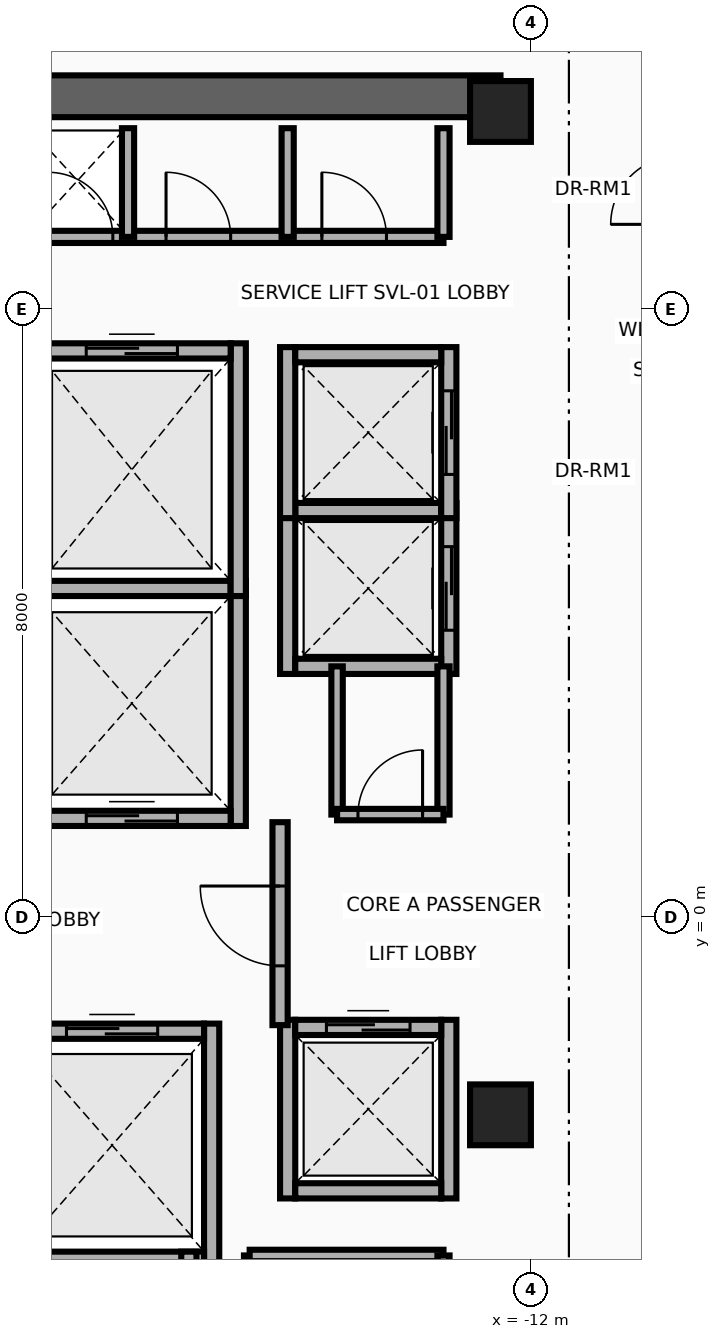
"""IFC4 building model, lengths in metres.
Left out: names, types, materials, properties, quantities, classifications, styles, units other than length and angle.
Written with IfcOpenShell. Run it as: python <this file> out.ifc"""

import sys

from ifc_helpers import new_model, si_unit, direction, frame, frame_2d, origin, origin_2d, place, context, subcontext, project, spatial, rectangle, extrude, source, transform, mapped, element, fill, save


model = new_model("IFC4")
c1 = context("Model", 3, precision=1e-05, world=origin(), true_north=direction((0.0, 1.0)))
c2 = subcontext(c1, "Body", "Model", "MODEL_VIEW")
j1 = project(units=[si_unit("LENGTHUNIT", "METRE"), si_unit("PLANEANGLEUNIT", "RADIAN")], contexts=[c1])
p1 = place(None, origin())
s1 = spatial("IfcSite", under=j1, at=p1, CompositionType="ELEMENT")
p2 = place(p1, origin())
s2 = spatial("IfcBuilding", under=s1, at=p2, CompositionType="ELEMENT")
p3 = place(p2, frame((0.0, 0.0, 251.0)))
s3 = spatial("IfcBuildingStorey", under=s2, at=p3, CompositionType="ELEMENT", Elevation=251.0)
p4 = place(p3, frame((-22.65, 10.8, 0.0), z_axis=(0.0, 0.0, 1.0), x_axis=(1.0, 0.0, 0.0)))
e1 = element("IfcWall", 1, at=p4, inside=s3, PredefinedType="SHEAR", context=c2, shape_type="SweptSolid", body=[
    extrude(rectangle(XDim=10.25, YDim=0.55, at=frame_2d((5.125, 0.0))), origin(), (0.0, 0.0, 1.0), 3.26),
])
m1 = source(origin(), c2, "Body", "SweptSolid", [
    extrude(rectangle(XDim=0.8, YDim=0.8, at=origin_2d()), origin(), (0.0, 0.0, 1.0), 3.5),
])
for number, where, z_axis, x_axis in (
    (2, (-12.4, -2.6, 0.0), (0.0, 0.0, 1.0), (1.0, 0.0, 0.0)),
    (3, (-12.4, 10.6, 0.0), (0.0, 0.0, 1.0), (1.0, 0.0, 0.0)),
):
    element("IfcColumn", number, at=place(p3, frame(where, z_axis=z_axis, x_axis=x_axis)), inside=s3, PredefinedType="COLUMN", context=c2, shape_type="MappedRepresentation", body=[
        mapped(m1, transform((0.0, 0.0, 0.0), x_axis=(1.0, 0.0, 0.0), y_axis=(0.0, 1.0, 0.0), z_axis=(0.0, 0.0, 1.0), scale=1.0)),
    ])
p5 = place(p3, frame((-15.85, 1.2, 0.0), z_axis=(0.0, 0.0, 1.0), x_axis=(0.0, 1.0, 0.0)))
e4 = element("IfcWall", 4, at=p5, inside=s3, PredefinedType="MOVABLE", context=c2, shape_type="SweptSolid", body=[
    extrude(rectangle(XDim=3.225, YDim=0.2, at=frame_2d((1.613, 0.0))), origin(), (0.0, 0.0, 1.0), 3.26),
])
p6 = place(p3, frame((-18.55, 1.3, 0.0), z_axis=(0.0, 0.0, 1.0), x_axis=(1.0, 0.0, 0.0)))
e5 = element("IfcWall", 5, at=p6, inside=s3, PredefinedType="MOVABLE", context=c2, shape_type="SweptSolid", body=[
    extrude(rectangle(XDim=2.6, YDim=0.2, at=frame_2d((1.3, 0.0))), origin(), (0.0, 0.0, 1.0), 3.26),
])
p7 = place(p6, frame((0.7, 0.0, 0.0)))
e6 = element("IfcOpeningElement", 6, at=p7, cuts=e5, PredefinedType="OPENING", context=c2, shape_type="SweptSolid", body=[
    extrude(rectangle(XDim=1.2, YDim=2.1, at=frame_2d((0.6, 1.05))), frame((0.0, 0.115, 0.0), z_axis=(0.0, -1.0, 0.0), x_axis=(1.0, 0.0, 0.0)), (0.0, 0.0, 1.0), 0.23),
])
p8 = place(p3, frame((-18.55, 4.325, 0.0), z_axis=(0.0, 0.0, 1.0), x_axis=(1.0, 0.0, 0.0)))
e7 = element("IfcWall", 7, at=p8, inside=s3, PredefinedType="MOVABLE", context=c2, shape_type="SweptSolid", body=[
    extrude(rectangle(XDim=2.6, YDim=0.2, at=frame_2d((1.3, 0.0))), origin(), (0.0, 0.0, 1.0), 3.26),
])
p9 = place(p3, frame((-16.2, -4.6, 0.0), z_axis=(0.0, 0.0, 1.0), x_axis=(0.0, 1.0, 0.0)))
e8 = element("IfcWall", 8, at=p9, inside=s3, PredefinedType="MOVABLE", context=c2, shape_type="SweptSolid", body=[
    extrude(rectangle(XDim=3.2, YDim=0.2, at=frame_2d((1.6, 0.0))), origin(), (0.0, 0.0, 1.0), 3.26),
])
p10 = place(p3, frame((-18.72, -4.5, 0.0), z_axis=(0.0, 0.0, 1.0), x_axis=(1.0, 0.0, 0.0)))
e9 = element("IfcWall", 9, at=p10, inside=s3, PredefinedType="MOVABLE", context=c2, shape_type="SweptSolid", body=[
    extrude(rectangle(XDim=2.42, YDim=0.2, at=frame_2d((1.21, 0.0))), origin(), (0.0, 0.0, 1.0), 3.26),
])
p11 = place(p3, frame((-18.72, -1.5, 0.0), z_axis=(0.0, 0.0, 1.0), x_axis=(1.0, 0.0, 0.0)))
e10 = element("IfcWall", 10, at=p11, inside=s3, PredefinedType="MOVABLE", context=c2, shape_type="SweptSolid", body=[
    extrude(rectangle(XDim=2.42, YDim=0.2, at=frame_2d((1.21, 0.0))), origin(), (0.0, 0.0, 1.0), 3.26),
])
p12 = place(p11, frame((0.61, 0.0, 0.0)))
e11 = element("IfcOpeningElement", 11, at=p12, cuts=e10, PredefinedType="OPENING", context=c2, shape_type="SweptSolid", body=[
    extrude(rectangle(XDim=1.2, YDim=2.1, at=frame_2d((0.6, 1.05))), frame((0.0, 0.115, 0.0), z_axis=(0.0, -1.0, 0.0), x_axis=(1.0, 0.0, 0.0)), (0.0, 0.0, 1.0), 0.23),
])
p13 = place(p3, frame((-15.85, 4.225, 0.0), z_axis=(0.0, 0.0, 1.0), x_axis=(0.0, 1.0, 0.0)))
e12 = element("IfcWall", 12, at=p13, inside=s3, PredefinedType="MOVABLE", context=c2, shape_type="SweptSolid", body=[
    extrude(rectangle(XDim=3.325, YDim=0.2, at=frame_2d((1.663, 0.0))), origin(), (0.0, 0.0, 1.0), 3.26),
])
p14 = place(p3, frame((-18.55, 7.45, 0.0), z_axis=(0.0, 0.0, 1.0), x_axis=(1.0, 0.0, 0.0)))
e13 = element("IfcWall", 13, at=p14, inside=s3, PredefinedType="MOVABLE", context=c2, shape_type="SweptSolid", body=[
    extrude(rectangle(XDim=2.6, YDim=0.2, at=frame_2d((1.3, 0.0))), origin(), (0.0, 0.0, 1.0), 3.26),
])
p15 = place(p14, frame((0.7, 0.0, 0.0)))
e14 = element("IfcOpeningElement", 14, at=p15, cuts=e13, PredefinedType="OPENING", context=c2, shape_type="SweptSolid", body=[
    extrude(rectangle(XDim=1.2, YDim=2.1, at=frame_2d((0.6, 1.05))), frame((0.0, 0.115, 0.0), z_axis=(0.0, -1.0, 0.0), x_axis=(1.0, 0.0, 0.0)), (0.0, 0.0, 1.0), 0.23),
])
p16 = place(p3, frame((-15.2, 3.2, 0.0), z_axis=(0.0, 0.0, 1.0), x_axis=(0.0, 1.0, 0.0)))
e15 = element("IfcWall", 15, at=p16, inside=s3, PredefinedType="MOVABLE", context=c2, shape_type="SweptSolid", body=[
    extrude(rectangle(XDim=2.25, YDim=0.2, at=frame_2d((1.125, 0.0))), origin(), (0.0, 0.0, 1.0), 3.26),
])
p17 = place(p3, frame((-13.08, 3.2, 0.0), z_axis=(0.0, 0.0, 1.0), x_axis=(0.0, 1.0, 0.0)))
e16 = element("IfcWall", 16, at=p17, inside=s3, PredefinedType="MOVABLE", context=c2, shape_type="SweptSolid", body=[
    extrude(rectangle(XDim=2.25, YDim=0.2, at=frame_2d((1.125, 0.0))), origin(), (0.0, 0.0, 1.0), 3.26),
])
p18 = place(p17, frame((0.575, 0.0, 0.0)))
e17 = element("IfcOpeningElement", 17, at=p18, cuts=e16, PredefinedType="OPENING", context=c2, shape_type="SweptSolid", body=[
    extrude(rectangle(XDim=1.1, YDim=2.1, at=frame_2d((0.55, 1.05))), frame((0.0, 0.115, 0.0), z_axis=(0.0, -1.0, 0.0), x_axis=(1.0, 0.0, 0.0)), (0.0, 0.0, 1.0), 0.23),
])
for number, where, z_axis, x_axis in (
    (18, (-15.1, 3.3, 0.0), (0.0, 0.0, 1.0), (1.0, 0.0, 0.0)),
    (19, (-15.1, 5.35, 0.0), (0.0, 0.0, 1.0), (1.0, 0.0, 0.0)),
):
    element("IfcWall", number, at=place(p3, frame(where, z_axis=z_axis, x_axis=x_axis)), inside=s3, PredefinedType="MOVABLE", context=c2, shape_type="SweptSolid", body=[
        extrude(rectangle(XDim=1.92, YDim=0.2, at=frame_2d((0.96, 0.0))), origin(), (0.0, 0.0, 1.0), 3.26),
    ])
p19 = place(p3, frame((-15.2, 5.25, 0.0), z_axis=(0.0, 0.0, 1.0), x_axis=(0.0, 1.0, 0.0)))
e20 = element("IfcWall", 20, at=p19, inside=s3, PredefinedType="MOVABLE", context=c2, shape_type="SweptSolid", body=[
    extrude(rectangle(XDim=2.25, YDim=0.2, at=frame_2d((1.125, 0.0))), origin(), (0.0, 0.0, 1.0), 3.26),
])
p20 = place(p3, frame((-13.08, 5.25, 0.0), z_axis=(0.0, 0.0, 1.0), x_axis=(0.0, 1.0, 0.0)))
e21 = element("IfcWall", 21, at=p20, inside=s3, PredefinedType="MOVABLE", context=c2, shape_type="SweptSolid", body=[
    extrude(rectangle(XDim=2.25, YDim=0.2, at=frame_2d((1.125, 0.0))), origin(), (0.0, 0.0, 1.0), 3.26),
])
p21 = place(p20, frame((0.575, 0.0, 0.0)))
e22 = element("IfcOpeningElement", 22, at=p21, cuts=e21, PredefinedType="OPENING", context=c2, shape_type="SweptSolid", body=[
    extrude(rectangle(XDim=1.1, YDim=2.1, at=frame_2d((0.55, 1.05))), frame((0.0, 0.115, 0.0), z_axis=(0.0, -1.0, 0.0), x_axis=(1.0, 0.0, 0.0)), (0.0, 0.0, 1.0), 0.23),
])
p22 = place(p3, frame((-15.1, 7.4, 0.0), z_axis=(0.0, 0.0, 1.0), x_axis=(1.0, 0.0, 0.0)))
e23 = element("IfcWall", 23, at=p22, inside=s3, PredefinedType="MOVABLE", context=c2, shape_type="SweptSolid", body=[
    extrude(rectangle(XDim=1.92, YDim=0.2, at=frame_2d((0.96, 0.0))), origin(), (0.0, 0.0, 1.0), 3.26),
])
p23 = place(p3, frame((-16.5, -6.7, 0.0), z_axis=(0.0, 0.0, 1.0), x_axis=(0.0, 1.0, 0.0)))
e24 = element("IfcWall", 24, at=p23, inside=s3, PredefinedType="MOVABLE", context=c2, shape_type="SweptSolid", body=[
    extrude(rectangle(XDim=2.3, YDim=0.2, at=frame_2d((1.15, 0.0))), origin(), (0.0, 0.0, 1.0), 3.26),
])
for number, where, z_axis, x_axis in (
    (25, (-15.2, -3.7, 0.0), (0.0, 0.0, 1.0), (0.0, 1.0, 0.0)),
    (26, (-13.08, -3.7, 0.0), (0.0, 0.0, 1.0), (0.0, 1.0, 0.0)),
):
    element("IfcWall", number, at=place(p3, frame(where, z_axis=z_axis, x_axis=x_axis)), inside=s3, PredefinedType="MOVABLE", context=c2, shape_type="SweptSolid", body=[
        extrude(rectangle(XDim=2.35, YDim=0.2, at=frame_2d((1.175, 0.0))), origin(), (0.0, 0.0, 1.0), 3.26),
    ])
p24 = place(p3, frame((-15.1, -3.6, 0.0), z_axis=(0.0, 0.0, 1.0), x_axis=(1.0, 0.0, 0.0)))
e27 = element("IfcWall", 27, at=p24, inside=s3, PredefinedType="MOVABLE", context=c2, shape_type="SweptSolid", body=[
    extrude(rectangle(XDim=1.92, YDim=0.2, at=frame_2d((0.96, 0.0))), origin(), (0.0, 0.0, 1.0), 3.26),
])
p25 = place(p3, frame((-15.1, -1.45, 0.0), z_axis=(0.0, 0.0, 1.0), x_axis=(1.0, 0.0, 0.0)))
e28 = element("IfcWall", 28, at=p25, inside=s3, PredefinedType="MOVABLE", context=c2, shape_type="SweptSolid", body=[
    extrude(rectangle(XDim=1.92, YDim=0.2, at=frame_2d((0.96, 0.0))), origin(), (0.0, 0.0, 1.0), 3.26),
])
p26 = place(p25, frame((0.41, 0.0, 0.0)))
e29 = element("IfcOpeningElement", 29, at=p26, cuts=e28, PredefinedType="OPENING", context=c2, shape_type="SweptSolid", body=[
    extrude(rectangle(XDim=1.1, YDim=2.1, at=frame_2d((0.55, 1.05))), frame((0.0, 0.115, 0.0), z_axis=(0.0, -1.0, 0.0), x_axis=(1.0, 0.0, 0.0)), (0.0, 0.0, 1.0), 0.23),
])
p27 = place(p3, frame((-15.3, -1.42, 0.0), z_axis=(0.0, 0.0, 1.0), x_axis=(0.0, 1.0, 0.0)))
e30 = element("IfcWall", 30, at=p27, inside=s3, PredefinedType="PARTITIONING", context=c2, shape_type="SweptSolid", body=[
    extrude(rectangle(XDim=2.67, YDim=0.2, at=frame_2d((1.335, 0.0))), origin(), (0.0, 0.0, 1.0), 3.26),
])
p28 = place(p27, frame((0.78, 0.0, 0.0)))
e31 = element("IfcOpeningElement", 31, at=p28, cuts=e30, PredefinedType="OPENING", context=c2, shape_type="SweptSolid", body=[
    extrude(rectangle(XDim=1.05, YDim=2.15, at=frame_2d((0.525, 1.075))), frame((0.0, 0.115, 0.0), z_axis=(0.0, -1.0, 0.0), x_axis=(1.0, 0.0, 0.0)), (0.0, 0.0, 1.0), 0.23),
])
p29 = place(p3, frame((-18.65, 8.95, 0.0), z_axis=(0.0, 0.0, 1.0), x_axis=(1.0, 0.0, 0.0)))
e32 = element("IfcWall", 32, at=p29, inside=s3, PredefinedType="PARTITIONING", context=c2, shape_type="SweptSolid", body=[
    extrude(rectangle(XDim=5.5, YDim=0.16, at=frame_2d((2.75, 0.0))), origin(), (0.0, 0.0, 1.0), 3.26),
])
p30 = place(p29, frame((0.3, 0.0, 0.0)))
e33 = element("IfcOpeningElement", 33, at=p30, cuts=e32, PredefinedType="OPENING", context=c2, shape_type="SweptSolid", body=[
    extrude(rectangle(XDim=0.85, YDim=2.05, at=frame_2d((0.425, 1.025))), frame((0.0, 0.095, 0.0), z_axis=(0.0, -1.0, 0.0), x_axis=(1.0, 0.0, 0.0)), (0.0, 0.0, 1.0), 0.19),
])
p31 = place(p29, frame((1.85, 0.0, 0.0)))
e34 = element("IfcOpeningElement", 34, at=p31, cuts=e32, PredefinedType="OPENING", context=c2, shape_type="SweptSolid", body=[
    extrude(rectangle(XDim=0.85, YDim=2.05, at=frame_2d((0.425, 1.025))), frame((0.0, 0.095, 0.0), z_axis=(0.0, -1.0, 0.0), x_axis=(1.0, 0.0, 0.0)), (0.0, 0.0, 1.0), 0.19),
])
p32 = place(p29, frame((3.9, 0.0, 0.0)))
e35 = element("IfcOpeningElement", 35, at=p32, cuts=e32, PredefinedType="OPENING", context=c2, shape_type="SweptSolid", body=[
    extrude(rectangle(XDim=0.85, YDim=2.05, at=frame_2d((0.425, 1.025))), frame((0.0, 0.095, 0.0), z_axis=(0.0, -1.0, 0.0), x_axis=(1.0, 0.0, 0.0)), (0.0, 0.0, 1.0), 0.19),
])
for number, where, z_axis, x_axis in (
    (36, (-13.15, 8.95, 0.0), (0.0, 0.0, 1.0), (0.0, 1.0, 0.0)),
    (37, (-17.3, 8.95, 0.0), (0.0, 0.0, 1.0), (0.0, 1.0, 0.0)),
    (38, (-15.2, 8.95, 0.0), (0.0, 0.0, 1.0), (0.0, 1.0, 0.0)),
):
    element("IfcWall", number, at=place(p3, frame(where, z_axis=z_axis, x_axis=x_axis)), inside=s3, PredefinedType="PARTITIONING", context=c2, shape_type="SweptSolid", body=[
        extrude(rectangle(XDim=1.43, YDim=0.16, at=frame_2d((0.715, 0.0))), origin(), (0.0, 0.0, 1.0), 3.26),
    ])
p33 = place(p3, frame((-15.7, -6.58, 0.0), z_axis=(0.0, 0.0, 1.0), x_axis=(0.0, 1.0, 0.0)))
e39 = element("IfcWall", 39, at=p33, inside=s3, PredefinedType="PARTITIONING", context=c2, shape_type="SweptSolid", body=[
    extrude(rectangle(XDim=2.13, YDim=0.15, at=frame_2d((1.065, 0.0))), origin(), (0.0, 0.0, 1.0), 3.26),
])
p34 = place(p3, frame((-15.7, -4.45, 0.0), z_axis=(0.0, 0.0, 1.0), x_axis=(1.0, 0.0, 0.0)))
e40 = element("IfcWall", 40, at=p34, inside=s3, PredefinedType="PARTITIONING", context=c2, shape_type="SweptSolid", body=[
    extrude(rectangle(XDim=2.55, YDim=0.15, at=frame_2d((1.275, 0.0))), origin(), (0.0, 0.0, 1.0), 3.26),
])
p35 = place(p3, frame((-13.15, -6.58, 0.0), z_axis=(0.0, 0.0, 1.0), x_axis=(0.0, 1.0, 0.0)))
e41 = element("IfcWall", 41, at=p35, inside=s3, PredefinedType="PARTITIONING", context=c2, shape_type="SweptSolid", body=[
    extrude(rectangle(XDim=2.13, YDim=0.16, at=frame_2d((1.065, 0.0))), origin(), (0.0, 0.0, 1.0), 3.26),
])
p36 = place(p3, frame((-13.15, 1.35, 0.0), z_axis=(0.0, 0.0, 1.0), x_axis=(0.0, 1.0, 0.0)))
e42 = element("IfcWall", 42, at=p36, inside=s3, PredefinedType="PARTITIONING", context=c2, shape_type="SweptSolid", body=[
    extrude(rectangle(XDim=1.95, YDim=0.16, at=frame_2d((0.975, 0.0))), origin(), (0.0, 0.0, 1.0), 3.26),
])
p37 = place(p3, frame((-14.55, 1.35, 0.0), z_axis=(0.0, 0.0, 1.0), x_axis=(0.0, 1.0, 0.0)))
e43 = element("IfcWall", 43, at=p37, inside=s3, PredefinedType="PARTITIONING", context=c2, shape_type="SweptSolid", body=[
    extrude(rectangle(XDim=1.95, YDim=0.15, at=frame_2d((0.975, 0.0))), origin(), (0.0, 0.0, 1.0), 3.26),
])
p38 = place(p3, frame((-14.55, 1.35, 0.0), z_axis=(0.0, 0.0, 1.0), x_axis=(1.0, 0.0, 0.0)))
e44 = element("IfcWall", 44, at=p38, inside=s3, PredefinedType="PARTITIONING", context=c2, shape_type="SweptSolid", body=[
    extrude(rectangle(XDim=1.4, YDim=0.15, at=frame_2d((0.7, 0.0))), origin(), (0.0, 0.0, 1.0), 3.26),
])
p39 = place(p38, frame((0.275, 0.0, 0.0)))
e45 = element("IfcOpeningElement", 45, at=p39, cuts=e44, PredefinedType="OPENING", context=c2, shape_type="SweptSolid", body=[
    extrude(rectangle(XDim=0.85, YDim=2.05, at=frame_2d((0.425, 1.025))), frame((0.0, 0.09, 0.0), z_axis=(0.0, -1.0, 0.0), x_axis=(1.0, 0.0, 0.0)), (0.0, 0.0, 1.0), 0.18),
])
p40 = place(p7, origin())
e46 = element("IfcDoor", 46, at=p40, inside=s3, OperationType="DOUBLE_DOOR_SLIDING", PredefinedType="DOOR", context=c2, shape_type="SweptSolid", body=[
    extrude(rectangle(XDim=1.2, YDim=2.1, at=frame_2d((0.6, 1.05))), frame((0.0, 0.025, 0.0), z_axis=(0.0, -1.0, 0.0), x_axis=(1.0, 0.0, 0.0)), (0.0, 0.0, 1.0), 0.05),
])
fill(e6, e46)
p41 = place(p12, origin())
e47 = element("IfcDoor", 47, at=p41, inside=s3, OperationType="DOUBLE_DOOR_SLIDING", PredefinedType="DOOR", context=c2, shape_type="SweptSolid", body=[
    extrude(rectangle(XDim=1.2, YDim=2.1, at=frame_2d((0.6, 1.05))), frame((0.0, 0.025, 0.0), z_axis=(0.0, -1.0, 0.0), x_axis=(1.0, 0.0, 0.0)), (0.0, 0.0, 1.0), 0.05),
])
fill(e11, e47)
p42 = place(p15, origin())
e48 = element("IfcDoor", 48, at=p42, inside=s3, OperationType="DOUBLE_DOOR_SLIDING", PredefinedType="DOOR", context=c2, shape_type="SweptSolid", body=[
    extrude(rectangle(XDim=1.2, YDim=2.1, at=frame_2d((0.6, 1.05))), frame((0.0, 0.025, 0.0), z_axis=(0.0, -1.0, 0.0), x_axis=(1.0, 0.0, 0.0)), (0.0, 0.0, 1.0), 0.05),
])
fill(e14, e48)
p43 = place(p18, origin())
e49 = element("IfcDoor", 49, at=p43, inside=s3, OperationType="DOUBLE_DOOR_SLIDING", PredefinedType="DOOR", context=c2, shape_type="SweptSolid", body=[
    extrude(rectangle(XDim=1.1, YDim=2.1, at=frame_2d((0.55, 1.05))), frame((0.0, 0.025, 0.0), z_axis=(0.0, -1.0, 0.0), x_axis=(1.0, 0.0, 0.0)), (0.0, 0.0, 1.0), 0.05),
])
fill(e17, e49)
p44 = place(p21, origin())
e50 = element("IfcDoor", 50, at=p44, inside=s3, OperationType="DOUBLE_DOOR_SLIDING", PredefinedType="DOOR", context=c2, shape_type="SweptSolid", body=[
    extrude(rectangle(XDim=1.1, YDim=2.1, at=frame_2d((0.55, 1.05))), frame((0.0, 0.025, 0.0), z_axis=(0.0, -1.0, 0.0), x_axis=(1.0, 0.0, 0.0)), (0.0, 0.0, 1.0), 0.05),
])
fill(e22, e50)
p45 = place(p26, origin())
e51 = element("IfcDoor", 51, at=p45, inside=s3, OperationType="DOUBLE_DOOR_SLIDING", PredefinedType="DOOR", context=c2, shape_type="SweptSolid", body=[
    extrude(rectangle(XDim=1.1, YDim=2.1, at=frame_2d((0.55, 1.05))), frame((0.0, 0.025, 0.0), z_axis=(0.0, -1.0, 0.0), x_axis=(1.0, 0.0, 0.0)), (0.0, 0.0, 1.0), 0.05),
])
fill(e29, e51)
p46 = place(p28, origin())
e52 = element("IfcDoor", 52, at=p46, inside=s3, OperationType="SINGLE_SWING_RIGHT", PredefinedType="DOOR", context=c2, shape_type="SweptSolid", body=[
    extrude(rectangle(XDim=1.05, YDim=2.15, at=frame_2d((0.525, 1.075))), frame((0.0, 0.025, 0.0), z_axis=(0.0, -1.0, 0.0), x_axis=(1.0, 0.0, 0.0)), (0.0, 0.0, 1.0), 0.05),
])
fill(e31, e52)
p47 = place(p30, origin())
e53 = element("IfcDoor", 53, at=p47, inside=s3, OperationType="SINGLE_SWING_LEFT", PredefinedType="DOOR", context=c2, shape_type="SweptSolid", body=[
    extrude(rectangle(XDim=0.85, YDim=2.05, at=frame_2d((0.425, 1.025))), frame((0.0, 0.025, 0.0), z_axis=(0.0, -1.0, 0.0), x_axis=(1.0, 0.0, 0.0)), (0.0, 0.0, 1.0), 0.05),
])
fill(e33, e53)
p48 = place(p31, origin())
e54 = element("IfcDoor", 54, at=p48, inside=s3, OperationType="SINGLE_SWING_RIGHT", PredefinedType="DOOR", context=c2, shape_type="SweptSolid", body=[
    extrude(rectangle(XDim=0.85, YDim=2.05, at=frame_2d((0.425, 1.025))), frame((0.0, 0.025, 0.0), z_axis=(0.0, -1.0, 0.0), x_axis=(1.0, 0.0, 0.0)), (0.0, 0.0, 1.0), 0.05),
])
fill(e34, e54)
p49 = place(p32, origin())
e55 = element("IfcDoor", 55, at=p49, inside=s3, OperationType="SINGLE_SWING_LEFT", PredefinedType="DOOR", context=c2, shape_type="SweptSolid", body=[
    extrude(rectangle(XDim=0.85, YDim=2.05, at=frame_2d((0.425, 1.025))), frame((0.0, 0.025, 0.0), z_axis=(0.0, -1.0, 0.0), x_axis=(1.0, 0.0, 0.0)), (0.0, 0.0, 1.0), 0.05),
])
fill(e35, e55)
p50 = place(p39, origin())
e56 = element("IfcDoor", 56, at=p50, inside=s3, OperationType="SINGLE_SWING_LEFT", PredefinedType="DOOR", context=c2, shape_type="SweptSolid", body=[
    extrude(rectangle(XDim=0.85, YDim=2.05, at=frame_2d((0.425, 1.025))), frame((0.0, 0.025, 0.0), z_axis=(0.0, -1.0, 0.0), x_axis=(1.0, 0.0, 0.0)), (0.0, 0.0, 1.0), 0.05),
])
fill(e45, e56)
save(model, sys.argv[1])
